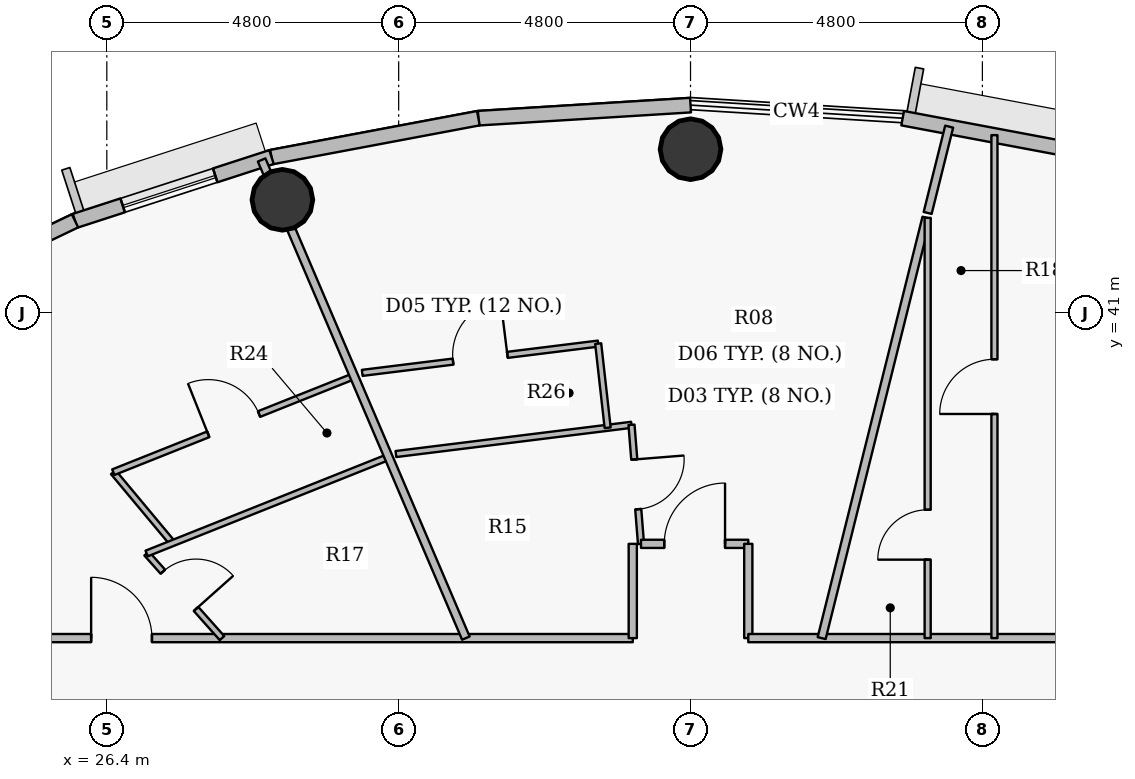
"""IFC4 building model, lengths in metres.
Left out: names, types, materials, properties, quantities, classifications, styles, units other than length and angle.
Written with IfcOpenShell. Run it as: python <this file> out.ifc"""

import sys

from ifc_helpers import new_model, si_unit, direction, frame, frame_2d, origin, origin_2d, place, context, subcontext, project, spatial, rectangle, hollow_circle, extrude, source, transform, mapped, element, fill, save


model = new_model("IFC4")
c1 = context("Model", 3, precision=1e-05, world=origin(), true_north=direction((0.0, 1.0)))
c2 = subcontext(c1, "Body", "Model", "MODEL_VIEW")
j1 = project(units=[si_unit("LENGTHUNIT", "METRE"), si_unit("PLANEANGLEUNIT", "RADIAN")], contexts=[c1])
p1 = place(None, origin())
s1 = spatial("IfcSite", under=j1, at=p1, CompositionType="ELEMENT")
p2 = place(p1, origin())
s2 = spatial("IfcBuilding", under=s1, at=p2, CompositionType="ELEMENT")
p3 = place(p2, frame((0.0, 0.0, 299.25)))
s3 = spatial("IfcBuildingStorey", under=s2, at=p3, CompositionType="ELEMENT", Elevation=299.25)
for number, where, z_axis, x_axis in (
    (1, (36.0, 43.69, 0.0), (0.0, 0.0, 1.0), (1.0, 0.0, 0.0)),
    (2, (29.288, 42.858, 0.0), (0.0, 0.0, 1.0), (1.0, 0.0, 0.0)),
):
    element("IfcColumn", number, at=place(p3, frame(where, z_axis=z_axis, x_axis=x_axis)), inside=s3, PredefinedType="COLUMN", context=c2, shape_type="SweptSolid", body=[
        extrude(hollow_circle(Radius=0.5, WallThickness=0.032, at=origin_2d()), origin(), (0.0, 0.0, 1.0), 3.75),
    ])
p4 = place(p3, frame((39.489, 44.2, 0.0), z_axis=(0.0, 0.0, 1.0), x_axis=(0.982782655757, -0.184765395959, 0.0)))
e3 = element("IfcWall", 3, at=p4, inside=s3, PredefinedType="SOLIDWALL", context=c2, shape_type="SweptSolid", body=[
    extrude(rectangle(XDim=3.462, YDim=0.24, at=frame_2d((1.731, 0.0))), origin(), (0.0, 0.0, 1.0), 3.5),
])
p5 = place(p3, frame((32.511, 44.2, 0.0), z_axis=(0.0, 0.0, 1.0), x_axis=(0.998104946479, 0.061534671648, 0.0)))
e4 = element("IfcWall", 4, at=p5, inside=s3, PredefinedType="SOLIDWALL", context=c2, shape_type="SweptSolid", body=[
    extrude(rectangle(XDim=3.495, YDim=0.24, at=frame_2d((1.748, 0.0))), origin(), (0.0, 0.0, 1.0), 3.5),
])
p6 = place(p3, frame((29.109, 43.56, 0.0), z_axis=(0.0, 0.0, 1.0), x_axis=(0.982782655757, 0.184765395959, 0.0)))
e5 = element("IfcWall", 5, at=p6, inside=s3, PredefinedType="SOLIDWALL", context=c2, shape_type="SweptSolid", body=[
    extrude(rectangle(XDim=3.462, YDim=0.24, at=frame_2d((1.731, 0.0))), origin(), (0.0, 0.0, 1.0), 3.5),
])
p7 = place(p3, frame((25.877, 42.512, 0.0), z_axis=(0.0, 0.0, 1.0), x_axis=(0.95123136723, 0.308478339592, 0.0)))
e6 = element("IfcWall", 6, at=p7, inside=s3, PredefinedType="SOLIDWALL", context=c2, shape_type="SweptSolid", body=[
    extrude(rectangle(XDim=3.398, YDim=0.24, at=frame_2d((1.699, 0.0))), origin(), (0.0, 0.0, 1.0), 3.5),
])
p8 = place(p7, frame((0.824, 0.0, 0.9)))
e7 = element("IfcOpeningElement", 7, at=p8, cuts=e6, PredefinedType="OPENING", context=c2, shape_type="SweptSolid", body=[
    extrude(rectangle(XDim=1.6, YDim=1.75, at=origin_2d()), frame((0.8, 0.13, 0.875), z_axis=(0.0, -1.0, 0.0), x_axis=(1.0, 0.0, 0.0)), (0.0, 0.0, 1.0), 0.26),
])
p9 = place(p3, frame((22.896, 41.082, 0.0), z_axis=(0.0, 0.0, 1.0), x_axis=(0.901573741254, 0.43262546051, 0.0)))
e8 = element("IfcWall", 8, at=p9, inside=s3, PredefinedType="SOLIDWALL", context=c2, shape_type="SweptSolid", body=[
    extrude(rectangle(XDim=3.307, YDim=0.24, at=frame_2d((1.653, 0.0))), origin(), (0.0, 0.0, 1.0), 3.5),
])
p10 = place(p9, frame((0.854, 0.0, 0.9)))
e9 = element("IfcOpeningElement", 9, at=p10, cuts=e8, PredefinedType="OPENING", context=c2, shape_type="SweptSolid", body=[
    extrude(rectangle(XDim=1.6, YDim=1.75, at=origin_2d()), frame((0.8, 0.13, 0.875), z_axis=(0.0, -1.0, 0.0), x_axis=(1.0, 0.0, 0.0)), (0.0, 0.0, 1.0), 0.26),
])
p11 = place(p3, frame((24.95, 35.65, 0.0), z_axis=(0.0, 0.0, 1.0), x_axis=(1.0, 0.0, 0.0)))
e10 = element("IfcWall", 10, at=p11, inside=s3, PredefinedType="PARTITIONING", context=c2, shape_type="SweptSolid", body=[
    extrude(rectangle(XDim=10.1, YDim=0.135, at=frame_2d((5.05, 0.0))), origin(), (0.0, 0.0, 1.0), 3.035),
])
p12 = place(p11, frame((1.192, 0.0, 0.0)))
e11 = element("IfcOpeningElement", 11, at=p12, cuts=e10, PredefinedType="OPENING", context=c2, shape_type="SweptSolid", body=[
    extrude(rectangle(XDim=1.0, YDim=2.15, at=origin_2d()), frame((0.5, 0.078, 1.075), z_axis=(0.0, -1.0, 0.0), x_axis=(1.0, 0.0, 0.0)), (0.0, 0.0, 1.0), 0.155),
])
p13 = place(p3, frame((26.507, 38.378, 0.0), z_axis=(0.0, 0.0, 1.0), x_axis=(0.640626707989, -0.767852473468, 0.0)))
e12 = element("IfcWall", 12, at=p13, inside=s3, PredefinedType="PARTITIONING", context=c2, shape_type="SweptSolid", body=[
    extrude(rectangle(XDim=1.52, YDim=0.1, at=frame_2d((0.76, 0.0))), origin(), (0.0, 0.0, 1.0), 3.5),
])
p14 = place(p3, frame((26.507, 38.378, 0.0), z_axis=(0.0, 0.0, 1.0), x_axis=(0.928788495711, 0.370610213345, 0.0)))
e13 = element("IfcWall", 13, at=p14, inside=s3, PredefinedType="PARTITIONING", context=c2, shape_type="SweptSolid", body=[
    extrude(rectangle(XDim=4.261, YDim=0.1, at=frame_2d((2.131, 0.0))), origin(), (0.0, 0.0, 1.0), 3.035),
])
p15 = place(p14, frame((1.681, 0.0, 0.0)))
e14 = element("IfcOpeningElement", 14, at=p15, cuts=e13, PredefinedType="OPENING", context=c2, shape_type="SweptSolid", body=[
    extrude(rectangle(XDim=0.9, YDim=2.1, at=origin_2d()), frame((0.45, 0.06, 1.05), z_axis=(0.0, -1.0, 0.0), x_axis=(1.0, 0.0, 0.0)), (0.0, 0.0, 1.0), 0.12),
])
p16 = place(p3, frame((27.055, 37.042, 0.0), z_axis=(0.0, 0.0, 1.0), x_axis=(0.665119722178, -0.746736737525, 0.0)))
e15 = element("IfcWall", 15, at=p16, inside=s3, PredefinedType="PARTITIONING", context=c2, shape_type="SweptSolid", body=[
    extrude(rectangle(XDim=1.864, YDim=0.1, at=frame_2d((0.932, 0.0))), origin(), (0.0, 0.0, 1.0), 3.5),
])
p17 = place(p16, frame((0.401, 0.0, 0.0)))
e16 = element("IfcOpeningElement", 16, at=p17, cuts=e15, PredefinedType="OPENING", context=c2, shape_type="SweptSolid", body=[
    extrude(rectangle(XDim=0.82, YDim=2.1, at=origin_2d()), frame((0.41, 0.06, 1.05), z_axis=(0.0, -1.0, 0.0), x_axis=(1.0, 0.0, 0.0)), (0.0, 0.0, 1.0), 0.12),
])
p18 = place(p3, frame((27.055, 37.042, 0.0), z_axis=(0.0, 0.0, 1.0), x_axis=(0.928814416372, 0.370545246819, 0.0)))
e17 = element("IfcWall", 17, at=p18, inside=s3, PredefinedType="PARTITIONING", context=c2, shape_type="SweptSolid", body=[
    extrude(rectangle(XDim=4.283, YDim=0.1, at=frame_2d((2.141, 0.0))), origin(), (0.0, 0.0, 1.0), 3.035),
])
p19 = place(p3, frame((28.946, 43.513, 0.0), z_axis=(0.0, 0.0, 1.0), x_axis=(0.392833513872, -0.919609607594, 0.0)))
e18 = element("IfcWall", 18, at=p19, inside=s3, PredefinedType="PARTITIONING", context=c2, shape_type="SweptSolid", body=[
    extrude(rectangle(XDim=8.55, YDim=0.135, at=frame_2d((4.275, 0.0))), origin(), (0.0, 0.0, 1.0), 3.035),
])
p20 = place(p3, frame((30.601, 40.011, 0.0), z_axis=(0.0, 0.0, 1.0), x_axis=(0.992391758007, 0.123120260886, 0.0)))
e19 = element("IfcWall", 19, at=p20, inside=s3, PredefinedType="PARTITIONING", context=c2, shape_type="SweptSolid", body=[
    extrude(rectangle(XDim=3.91, YDim=0.1, at=frame_2d((1.955, 0.0))), origin(), (0.0, 0.0, 1.0), 3.035),
])
p21 = place(p20, frame((1.505, 0.0, 0.0)))
e20 = element("IfcOpeningElement", 20, at=p21, cuts=e19, PredefinedType="OPENING", context=c2, shape_type="SweptSolid", body=[
    extrude(rectangle(XDim=0.9, YDim=2.1, at=origin_2d()), frame((0.45, 0.06, 1.05), z_axis=(0.0, -1.0, 0.0), x_axis=(1.0, 0.0, 0.0)), (0.0, 0.0, 1.0), 0.12),
])
p22 = place(p3, frame((31.155, 38.677, 0.0), z_axis=(0.0, 0.0, 1.0), x_axis=(0.992398620659, 0.123064932921, 0.0)))
e21 = element("IfcWall", 21, at=p22, inside=s3, PredefinedType="PARTITIONING", context=c2, shape_type="SweptSolid", body=[
    extrude(rectangle(XDim=3.904, YDim=0.1, at=frame_2d((1.952, 0.0))), origin(), (0.0, 0.0, 1.0), 3.035),
])
p23 = place(p3, frame((34.481, 40.493, 0.0), z_axis=(0.0, 0.0, 1.0), x_axis=(0.111835884353, -0.993726690278, 0.0)))
e22 = element("IfcWall", 22, at=p23, inside=s3, PredefinedType="PARTITIONING", context=c2, shape_type="SweptSolid", body=[
    extrude(rectangle(XDim=1.393, YDim=0.1, at=frame_2d((0.696, 0.0))), origin(), (0.0, 0.0, 1.0), 3.085),
])
p24 = place(p3, frame((35.029, 39.158, 0.0), z_axis=(0.0, 0.0, 1.0), x_axis=(0.079557473452, -0.996830280649, 0.0)))
e23 = element("IfcWall", 23, at=p24, inside=s3, PredefinedType="PARTITIONING", context=c2, shape_type="SweptSolid", body=[
    extrude(rectangle(XDim=1.964, YDim=0.1, at=frame_2d((0.982, 0.0))), origin(), (0.0, 0.0, 1.0), 3.5),
])
p25 = place(p24, frame((0.572, 0.0, 0.0)))
e24 = element("IfcOpeningElement", 24, at=p25, cuts=e23, PredefinedType="OPENING", context=c2, shape_type="SweptSolid", body=[
    extrude(rectangle(XDim=0.82, YDim=2.1, at=origin_2d()), frame((0.41, 0.06, 1.05), z_axis=(0.0, -1.0, 0.0), x_axis=(1.0, 0.0, 0.0)), (0.0, 0.0, 1.0), 0.12),
])
p26 = place(p3, frame((35.05, 35.65, 0.0), z_axis=(0.0, 0.0, 1.0), x_axis=(0.0, 1.0, 0.0)))
e25 = element("IfcWall", 25, at=p26, inside=s3, PredefinedType="PARTITIONING", context=c2, shape_type="SweptSolid", body=[
    extrude(rectangle(XDim=1.55, YDim=0.135, at=frame_2d((0.775, 0.0))), origin(), (0.0, 0.0, 1.0), 3.5),
])
p27 = place(p3, frame((35.186, 37.2, 0.0), z_axis=(0.0, 0.0, 1.0), x_axis=(1.0, 0.0, 0.0)))
e26 = element("IfcWall", 26, at=p27, inside=s3, PredefinedType="PARTITIONING", context=c2, shape_type="SweptSolid", body=[
    extrude(rectangle(XDim=1.764, YDim=0.135, at=frame_2d((0.882, 0.0))), origin(), (0.0, 0.0, 1.0), 3.035),
])
p28 = place(p27, frame((0.382, 0.0, 0.0)))
e27 = element("IfcOpeningElement", 27, at=p28, cuts=e26, PredefinedType="OPENING", context=c2, shape_type="SweptSolid", body=[
    extrude(rectangle(XDim=1.0, YDim=2.15, at=origin_2d()), frame((0.5, 0.078, 1.075), z_axis=(0.0, -1.0, 0.0), x_axis=(1.0, 0.0, 0.0)), (0.0, 0.0, 1.0), 0.155),
])
p29 = place(p3, frame((36.95, 35.65, 0.0), z_axis=(0.0, 0.0, 1.0), x_axis=(0.0, 1.0, 0.0)))
e28 = element("IfcWall", 28, at=p29, inside=s3, PredefinedType="PARTITIONING", context=c2, shape_type="SweptSolid", body=[
    extrude(rectangle(XDim=1.55, YDim=0.135, at=frame_2d((0.775, 0.0))), origin(), (0.0, 0.0, 1.0), 3.5),
])
p30 = place(p3, frame((36.95, 35.65, 0.0), z_axis=(0.0, 0.0, 1.0), x_axis=(1.0, 0.0, 0.0)))
e29 = element("IfcWall", 29, at=p30, inside=s3, PredefinedType="PARTITIONING", context=c2, shape_type="SweptSolid", body=[
    extrude(rectangle(XDim=10.1, YDim=0.135, at=frame_2d((5.05, 0.0))), origin(), (0.0, 0.0, 1.0), 3.035),
])
p31 = place(p30, frame((6.477, 0.0, 0.0)))
e30 = element("IfcOpeningElement", 30, at=p31, cuts=e29, PredefinedType="OPENING", context=c2, shape_type="SweptSolid", body=[
    extrude(rectangle(XDim=1.0, YDim=2.15, at=origin_2d()), frame((0.5, 0.078, 1.075), z_axis=(0.0, -1.0, 0.0), x_axis=(1.0, 0.0, 0.0)), (0.0, 0.0, 1.0), 0.155),
])
p32 = place(p3, frame((38.157, 35.65, 0.0), z_axis=(0.0, 0.0, 1.0), x_axis=(0.241898679066, 0.970301514513, 0.0)))
e31 = element("IfcWall", 31, at=p32, inside=s3, PredefinedType="PARTITIONING", context=c2, shape_type="SweptSolid", body=[
    extrude(rectangle(XDim=7.125, YDim=0.135, at=frame_2d((3.563, 0.0))), origin(), (0.0, 0.0, 1.0), 3.5),
])
p33 = place(p3, frame((39.9, 35.65, 0.0), z_axis=(0.0, 0.0, 1.0), x_axis=(0.0, 1.0, 0.0)))
e32 = element("IfcWall", 32, at=p33, inside=s3, PredefinedType="PARTITIONING", context=c2, shape_type="SweptSolid", body=[
    extrude(rectangle(XDim=6.911, YDim=0.1, at=frame_2d((3.456, 0.0))), origin(), (0.0, 0.0, 1.0), 3.5),
])
p34 = place(p33, frame((1.29, 0.0, 0.0)))
e33 = element("IfcOpeningElement", 33, at=p34, cuts=e32, PredefinedType="OPENING", context=c2, shape_type="SweptSolid", body=[
    extrude(rectangle(XDim=0.82, YDim=2.1, at=origin_2d()), frame((0.41, 0.06, 1.05), z_axis=(0.0, -1.0, 0.0), x_axis=(1.0, 0.0, 0.0)), (0.0, 0.0, 1.0), 0.12),
])
p35 = place(p3, frame((39.9, 42.642, 0.0), z_axis=(0.0, 0.0, 1.0), x_axis=(0.241985841386, 0.970279780563, 0.0)))
e34 = element("IfcWall", 34, at=p35, inside=s3, PredefinedType="PARTITIONING", context=c2, shape_type="SweptSolid", body=[
    extrude(rectangle(XDim=1.463, YDim=0.135, at=frame_2d((0.731, 0.0))), origin(), (0.0, 0.0, 1.0), 2.985),
])
p36 = place(p3, frame((40.998, 35.65, 0.0), z_axis=(0.0, 0.0, 1.0), x_axis=(0.0, 1.0, 0.0)))
e35 = element("IfcWall", 35, at=p36, inside=s3, PredefinedType="PARTITIONING", context=c2, shape_type="SweptSolid", body=[
    extrude(rectangle(XDim=8.271, YDim=0.1, at=frame_2d((4.136, 0.0))), origin(), (0.0, 0.0, 1.0), 2.985),
])
p37 = place(p36, frame((3.686, 0.0, 0.0)))
e36 = element("IfcOpeningElement", 36, at=p37, cuts=e35, PredefinedType="OPENING", context=c2, shape_type="SweptSolid", body=[
    extrude(rectangle(XDim=0.9, YDim=2.1, at=origin_2d()), frame((0.45, 0.06, 1.05), z_axis=(0.0, -1.0, 0.0), x_axis=(1.0, 0.0, 0.0)), (0.0, 0.0, 1.0), 0.12),
])
m1 = source(origin(), c2, "Body", "SweptSolid", [
    extrude(rectangle(XDim=1.6, YDim=1.75, at=origin_2d()), frame((0.8, 0.03, 0.875), z_axis=(0.0, -1.0, 0.0), x_axis=(1.0, 0.0, 0.0)), (0.0, 0.0, 1.0), 0.06),
])
p38 = place(p8, origin())
e37 = element("IfcWindow", 37, at=p38, inside=s3, PartitioningType="DOUBLE_PANEL_VERTICAL", PredefinedType="WINDOW", context=c2, shape_type="MappedRepresentation", body=[
    mapped(m1, transform((0.0, 0.0, 0.0), x_axis=(1.0, 0.0, 0.0), y_axis=(0.0, 1.0, 0.0), z_axis=(0.0, 0.0, 1.0), scale=1.0)),
])
fill(e7, e37)
m2 = source(origin(), c2, "Body", "SweptSolid", [
    extrude(rectangle(XDim=1.0, YDim=2.15, at=origin_2d()), frame((0.5, 0.025, 1.075), z_axis=(0.0, -1.0, 0.0), x_axis=(1.0, 0.0, 0.0)), (0.0, 0.0, 1.0), 0.05),
])
p39 = place(p28, origin())
e38 = element("IfcDoor", 38, at=p39, inside=s3, OperationType="SINGLE_SWING_RIGHT", PredefinedType="DOOR", context=c2, shape_type="MappedRepresentation", body=[
    mapped(m2, transform((0.0, 0.0, 0.0), x_axis=(1.0, 0.0, 0.0), y_axis=(0.0, 1.0, 0.0), z_axis=(0.0, 0.0, 1.0), scale=1.0)),
])
fill(e27, e38)
m3 = source(origin(), c2, "Body", "SweptSolid", [
    extrude(rectangle(XDim=0.82, YDim=2.1, at=origin_2d()), frame((0.41, 0.025, 1.05), z_axis=(0.0, -1.0, 0.0), x_axis=(1.0, 0.0, 0.0)), (0.0, 0.0, 1.0), 0.05),
])
p40 = place(p25, origin())
e39 = element("IfcDoor", 39, at=p40, inside=s3, OperationType="SINGLE_SWING_LEFT", PredefinedType="DOOR", context=c2, shape_type="MappedRepresentation", body=[
    mapped(m3, transform((0.0, 0.0, 0.0), x_axis=(1.0, 0.0, 0.0), y_axis=(0.0, 1.0, 0.0), z_axis=(0.0, 0.0, 1.0), scale=1.0)),
])
fill(e24, e39)
m4 = source(origin(), c2, "Body", "SweptSolid", [
    extrude(rectangle(XDim=0.9, YDim=2.1, at=origin_2d()), frame((0.45, 0.025, 1.05), z_axis=(0.0, -1.0, 0.0), x_axis=(1.0, 0.0, 0.0)), (0.0, 0.0, 1.0), 0.05),
])
p41 = place(p21, origin())
e40 = element("IfcDoor", 40, at=p41, inside=s3, OperationType="SINGLE_SWING_RIGHT", PredefinedType="DOOR", context=c2, shape_type="MappedRepresentation", body=[
    mapped(m4, transform((0.0, 0.0, 0.0), x_axis=(1.0, 0.0, 0.0), y_axis=(0.0, 1.0, 0.0), z_axis=(0.0, 0.0, 1.0), scale=1.0)),
])
fill(e20, e40)
p42 = place(p12, origin())
e41 = element("IfcDoor", 41, at=p42, inside=s3, OperationType="SINGLE_SWING_LEFT", PredefinedType="DOOR", context=c2, shape_type="MappedRepresentation", body=[
    mapped(m2, transform((0.0, 0.0, 0.0), x_axis=(1.0, 0.0, 0.0), y_axis=(0.0, 1.0, 0.0), z_axis=(0.0, 0.0, 1.0), scale=1.0)),
])
fill(e11, e41)
p43 = place(p17, origin())
e42 = element("IfcDoor", 42, at=p43, inside=s3, OperationType="SINGLE_SWING_RIGHT", PredefinedType="DOOR", context=c2, shape_type="MappedRepresentation", body=[
    mapped(m3, transform((0.0, 0.0, 0.0), x_axis=(1.0, 0.0, 0.0), y_axis=(0.0, 1.0, 0.0), z_axis=(0.0, 0.0, 1.0), scale=1.0)),
])
fill(e16, e42)
p44 = place(p15, origin())
e43 = element("IfcDoor", 43, at=p44, inside=s3, OperationType="SINGLE_SWING_LEFT", PredefinedType="DOOR", context=c2, shape_type="MappedRepresentation", body=[
    mapped(m4, transform((0.0, 0.0, 0.0), x_axis=(1.0, 0.0, 0.0), y_axis=(0.0, 1.0, 0.0), z_axis=(0.0, 0.0, 1.0), scale=1.0)),
])
fill(e14, e43)
p45 = place(p37, origin())
e44 = element("IfcDoor", 44, at=p45, inside=s3, OperationType="SINGLE_SWING_LEFT", PredefinedType="DOOR", context=c2, shape_type="MappedRepresentation", body=[
    mapped(m4, transform((0.0, 0.0, 0.0), x_axis=(1.0, 0.0, 0.0), y_axis=(0.0, 1.0, 0.0), z_axis=(0.0, 0.0, 1.0), scale=1.0)),
])
fill(e36, e44)
p46 = place(p34, origin())
e45 = element("IfcDoor", 45, at=p46, inside=s3, OperationType="SINGLE_SWING_LEFT", PredefinedType="DOOR", context=c2, shape_type="MappedRepresentation", body=[
    mapped(m3, transform((0.0, 0.0, 0.0), x_axis=(1.0, 0.0, 0.0), y_axis=(0.0, 1.0, 0.0), z_axis=(0.0, 0.0, 1.0), scale=1.0)),
])
fill(e33, e45)
save(model, sys.argv[1])
